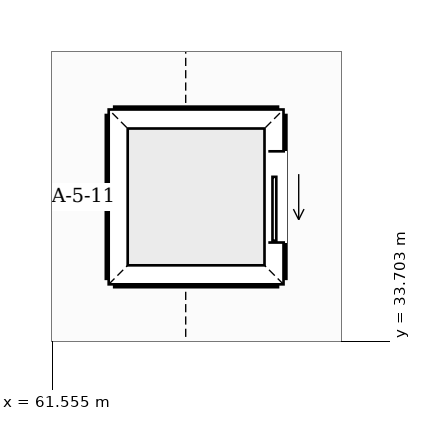
"""IFC4 building model, lengths in metres.
Left out: names, types, materials, properties, quantities, classifications, styles, units other than length and angle.
Written with IfcOpenShell. Run it as: python <this file> out.ifc"""

import sys

from ifc_helpers import new_model, si_unit, direction, frame, frame_2d, origin, place, context, subcontext, project, spatial, rectangle, extrude, element, fill, save


model = new_model("IFC4")
c1 = context("Model", 3, precision=1e-05, world=origin(), true_north=direction((0.0, 1.0)))
c2 = subcontext(c1, "Body", "Model", "MODEL_VIEW")
j1 = project(units=[si_unit("LENGTHUNIT", "METRE"), si_unit("PLANEANGLEUNIT", "RADIAN")], contexts=[c1])
p1 = place(None, origin())
s1 = spatial("IfcSite", under=j1, at=p1, CompositionType="ELEMENT")
p2 = place(p1, origin())
s2 = spatial("IfcBuilding", under=s1, at=p2, CompositionType="ELEMENT")
p3 = place(p2, frame((0.0, 0.0, 5.4)))
s3 = spatial("IfcBuildingStorey", under=s2, at=p3, CompositionType="ELEMENT", Elevation=5.4)
for number, where, z_axis, x_axis in (
    (1, (62.39, 36.66, 0.0), (0.0, 0.0, 1.0), (1.0, 0.0, 0.0)),
    (2, (62.39, 34.54, 0.0), (0.0, 0.0, 1.0), (1.0, 0.0, 0.0)),
):
    element("IfcWall", number, at=place(p3, frame(where, z_axis=z_axis, x_axis=x_axis)), inside=s3, PredefinedType="SHEAR", context=c2, shape_type="SweptSolid", body=[
        extrude(rectangle(XDim=2.12, YDim=0.22, at=frame_2d((1.06, 0.0))), origin(), (0.0, 0.0, 1.0), 4.55),
    ])
p4 = place(p3, frame((64.51, 34.54, 0.0), z_axis=(0.0, 0.0, 1.0), x_axis=(0.0, 1.0, 0.0)))
e3 = element("IfcWall", 3, at=p4, inside=s3, PredefinedType="SHEAR", context=c2, shape_type="SweptSolid", body=[
    extrude(rectangle(XDim=2.12, YDim=0.22, at=frame_2d((1.06, 0.0))), origin(), (0.0, 0.0, 1.0), 4.55),
])
p5 = place(p4, frame((0.46, 0.0, 0.0)))
e4 = element("IfcOpeningElement", 4, at=p5, cuts=e3, PredefinedType="OPENING", context=c2, shape_type="SweptSolid", body=[
    extrude(rectangle(XDim=1.2, YDim=2.25, at=frame_2d((0.6, 1.125))), frame((0.0, 0.12, 0.0), z_axis=(0.0, -1.0, 0.0), x_axis=(1.0, 0.0, 0.0)), (0.0, 0.0, 1.0), 0.24),
])
p6 = place(p3, frame((62.39, 34.54, 0.0), z_axis=(0.0, 0.0, 1.0), x_axis=(0.0, 1.0, 0.0)))
e5 = element("IfcWall", 5, at=p6, inside=s3, PredefinedType="SHEAR", context=c2, shape_type="SweptSolid", body=[
    extrude(rectangle(XDim=2.12, YDim=0.22, at=frame_2d((1.06, 0.0))), origin(), (0.0, 0.0, 1.0), 4.55),
])
p7 = place(p5, origin())
e6 = element("IfcDoor", 6, at=p7, inside=s3, OperationType="SLIDING_TO_LEFT", PredefinedType="DOOR", context=c2, shape_type="SweptSolid", body=[
    extrude(rectangle(XDim=1.2, YDim=2.25, at=frame_2d((0.6, 1.125))), frame((0.0, 0.025, 0.0), z_axis=(0.0, -1.0, 0.0), x_axis=(1.0, 0.0, 0.0)), (0.0, 0.0, 1.0), 0.05),
])
fill(e4, e6)
save(model, sys.argv[1])
